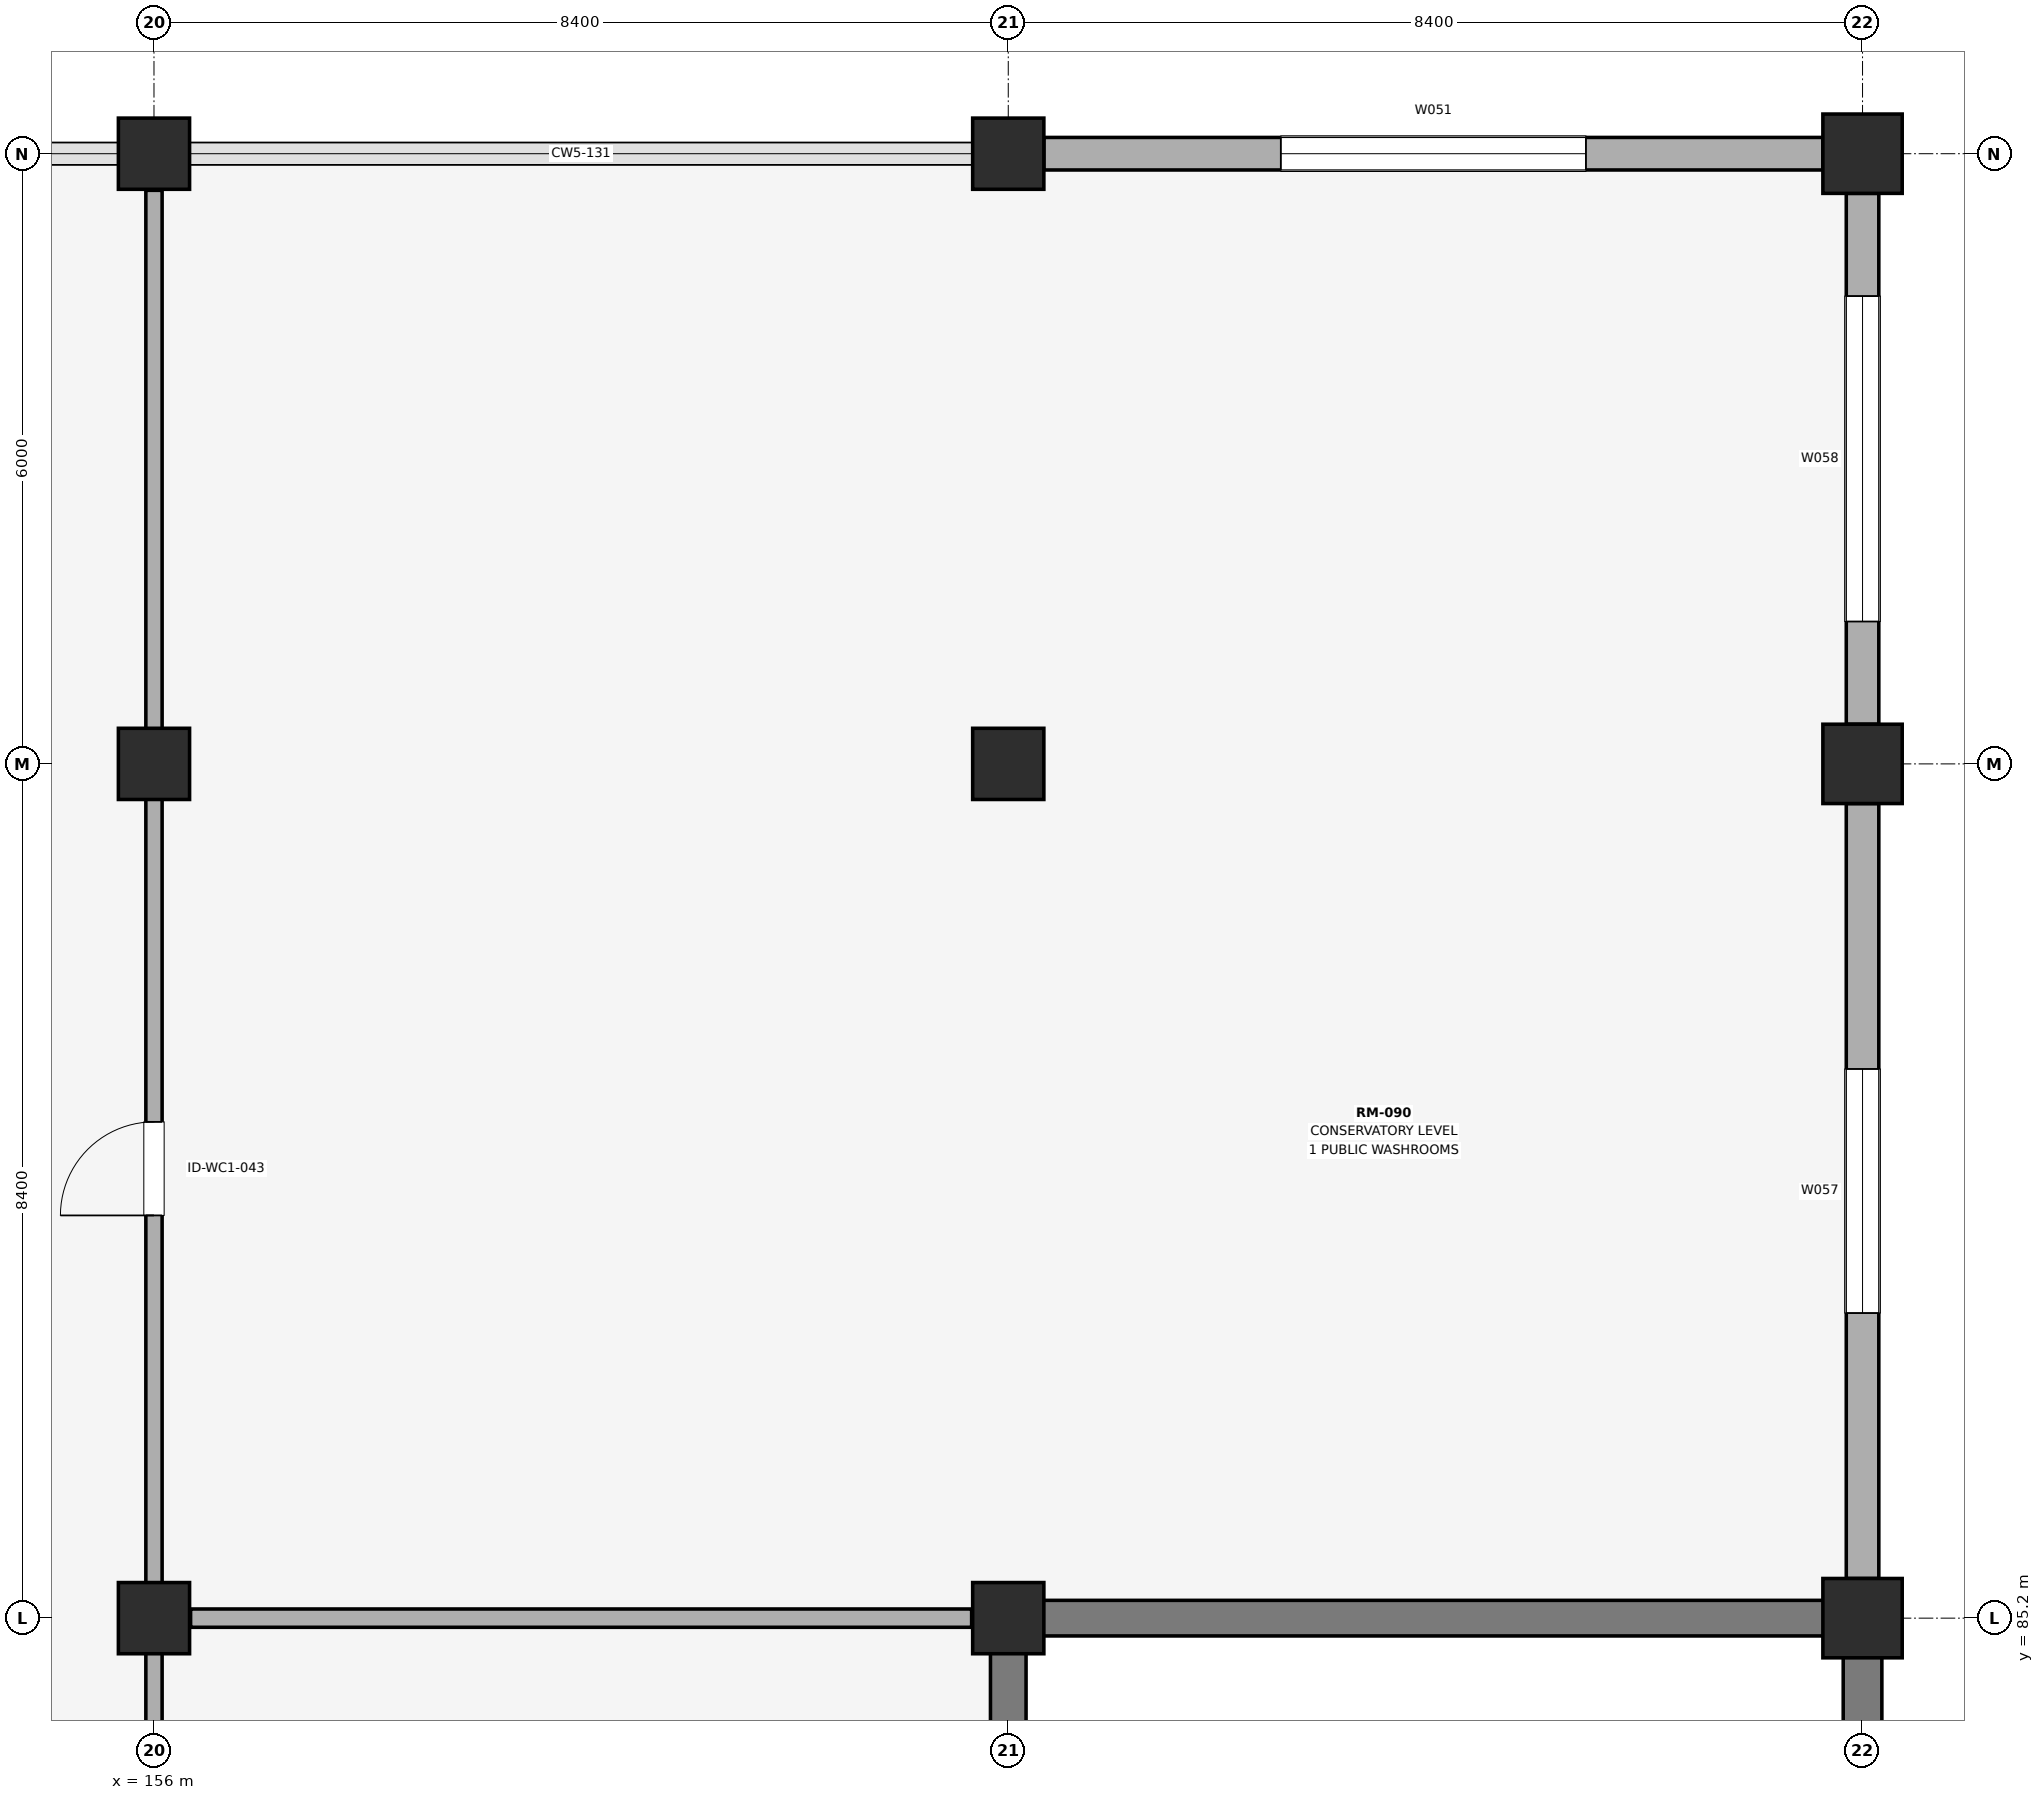
"""IFC4 building model, lengths in metres.
Left out: names, types, materials, properties, quantities, classifications, styles, units other than length and angle.
Written with IfcOpenShell. Run it as: python <this file> out.ifc"""

import sys

from ifc_helpers import new_model, si_unit, direction, frame, frame_2d, origin, origin_2d, place, context, subcontext, project, spatial, rectangle, extrude, element, fill, save


model = new_model("IFC4")
c1 = context("Model", 3, precision=1e-05, world=origin(), true_north=direction((0.0, 1.0)))
c2 = subcontext(c1, "Body", "Model", "MODEL_VIEW")
j1 = project(units=[si_unit("LENGTHUNIT", "METRE"), si_unit("PLANEANGLEUNIT", "RADIAN")], contexts=[c1])
p1 = place(None, origin())
s1 = spatial("IfcSite", under=j1, at=p1, CompositionType="ELEMENT")
p2 = place(p1, origin())
s2 = spatial("IfcBuilding", under=s1, at=p2, CompositionType="ELEMENT")
p3 = place(p2, frame((0.0, 0.0, 5.4)))
s3 = spatial("IfcBuildingStorey", under=s2, at=p3, CompositionType="ELEMENT", Elevation=5.4)
for number, where, z_axis, x_axis in (
    (1, (156.0, 85.2, 0.0), (0.0, 0.0, 1.0), (1.0, 0.0, 0.0)),
    (2, (156.0, 93.6, 0.0), (0.0, 0.0, 1.0), (1.0, 0.0, 0.0)),
    (3, (156.0, 99.6, 0.0), (0.0, 0.0, 1.0), (1.0, 0.0, 0.0)),
    (4, (164.4, 85.2, 0.0), (0.0, 0.0, 1.0), (1.0, 0.0, 0.0)),
    (5, (164.4, 93.6, 0.0), (0.0, 0.0, 1.0), (1.0, 0.0, 0.0)),
    (6, (164.4, 99.6, 0.0), (0.0, 0.0, 1.0), (1.0, 0.0, 0.0)),
):
    element("IfcColumn", number, at=place(p3, frame(where, z_axis=z_axis, x_axis=x_axis)), inside=s3, PredefinedType="COLUMN", context=c2, shape_type="SweptSolid", body=[
        extrude(rectangle(XDim=0.7, YDim=0.7, at=origin_2d()), origin(), (0.0, 0.0, 1.0), 4.8),
    ])
for number, where, z_axis, x_axis in (
    (7, (172.8, 85.2, 0.0), (0.0, 0.0, 1.0), (1.0, 0.0, 0.0)),
    (8, (172.8, 93.6, 0.0), (0.0, 0.0, 1.0), (1.0, 0.0, 0.0)),
    (9, (172.8, 99.6, 0.0), (0.0, 0.0, 1.0), (1.0, 0.0, 0.0)),
):
    element("IfcColumn", number, at=place(p3, frame(where, z_axis=z_axis, x_axis=x_axis)), inside=s3, PredefinedType="COLUMN", context=c2, shape_type="SweptSolid", body=[
        extrude(rectangle(XDim=0.78, YDim=0.78, at=origin_2d()), origin(), (0.0, 0.0, 1.0), 4.8),
    ])
p4 = place(p3, frame((164.225, 85.2, 0.0), z_axis=(0.0, 0.0, 1.0), x_axis=(1.0, 0.0, 0.0)))
e10 = element("IfcWall", 10, at=p4, inside=s3, PredefinedType="SHEAR", context=c2, shape_type="SweptSolid", body=[
    extrude(rectangle(XDim=8.75, YDim=0.35, at=frame_2d((4.375, 0.0))), origin(), (0.0, 0.0, 1.0), 4.8),
])
p5 = place(p3, frame((164.4, 77.575, 0.0), z_axis=(0.0, 0.0, 1.0), x_axis=(0.0, 1.0, 0.0)))
e11 = element("IfcWall", 11, at=p5, inside=s3, PredefinedType="SHEAR", context=c2, shape_type="SweptSolid", body=[
    extrude(rectangle(XDim=7.45, YDim=0.35, at=frame_2d((3.725, 0.0))), origin(), (0.0, 0.0, 1.0), 4.8),
])
p6 = place(p5, frame((2.1, 0.0, 0.0)))
e12 = element("IfcOpeningElement", 12, at=p6, cuts=e11, PredefinedType="OPENING", context=c2, shape_type="SweptSolid", body=[
    extrude(rectangle(XDim=1.1, YDim=2.2, at=frame_2d((0.55, 1.1))), frame((0.0, 0.185, 0.0), z_axis=(0.0, -1.0, 0.0), x_axis=(1.0, 0.0, 0.0)), (0.0, 0.0, 1.0), 0.37),
])
p7 = place(p3, frame((172.8, 77.575, 0.0), z_axis=(0.0, 0.0, 1.0), x_axis=(0.0, 1.0, 0.0)))
e13 = element("IfcWall", 13, at=p7, inside=s3, PredefinedType="SHEAR", context=c2, shape_type="SweptSolid", body=[
    extrude(rectangle(XDim=7.45, YDim=0.38, at=frame_2d((3.725, 0.0))), origin(), (0.0, 0.0, 1.0), 4.8),
])
p8 = place(p3, frame((164.75, 99.6, 0.0), z_axis=(0.0, 0.0, 1.0), x_axis=(1.0, 0.0, 0.0)))
e14 = element("IfcWall", 14, at=p8, inside=s3, PredefinedType="SOLIDWALL", context=c2, shape_type="SweptSolid", body=[
    extrude(rectangle(XDim=7.66, YDim=0.32, at=frame_2d((3.83, 0.0))), origin(), (0.0, 0.0, 1.0), 3.78),
])
p9 = place(p8, frame((2.33, 0.0, 0.95)))
e15 = element("IfcOpeningElement", 15, at=p9, cuts=e14, PredefinedType="OPENING", context=c2, shape_type="SweptSolid", body=[
    extrude(rectangle(XDim=3.0, YDim=1.8, at=frame_2d((1.5, 0.9))), frame((0.0, 0.17, 0.0), z_axis=(0.0, -1.0, 0.0), x_axis=(1.0, 0.0, 0.0)), (0.0, 0.0, 1.0), 0.34),
])
p10 = place(p3, frame((172.8, 85.59, 0.0), z_axis=(0.0, 0.0, 1.0), x_axis=(0.0, 1.0, 0.0)))
e16 = element("IfcWall", 16, at=p10, inside=s3, PredefinedType="SOLIDWALL", context=c2, shape_type="SweptSolid", body=[
    extrude(rectangle(XDim=7.62, YDim=0.32, at=frame_2d((3.81, 0.0))), origin(), (0.0, 0.0, 1.0), 3.8),
])
p11 = place(p10, frame((2.61, 0.0, 0.9)))
e17 = element("IfcOpeningElement", 17, at=p11, cuts=e16, PredefinedType="OPENING", context=c2, shape_type="SweptSolid", body=[
    extrude(rectangle(XDim=2.4, YDim=2.1, at=frame_2d((1.2, 1.05))), frame((0.0, 0.17, 0.0), z_axis=(0.0, -1.0, 0.0), x_axis=(1.0, 0.0, 0.0)), (0.0, 0.0, 1.0), 0.34),
])
p12 = place(p3, frame((172.8, 93.99, 0.0), z_axis=(0.0, 0.0, 1.0), x_axis=(0.0, 1.0, 0.0)))
e18 = element("IfcWall", 18, at=p12, inside=s3, PredefinedType="SOLIDWALL", context=c2, shape_type="SweptSolid", body=[
    extrude(rectangle(XDim=5.22, YDim=0.32, at=frame_2d((2.61, 0.0))), origin(), (0.0, 0.0, 1.0), 3.8),
])
p13 = place(p12, frame((1.01, 0.0, 0.9)))
e19 = element("IfcOpeningElement", 19, at=p13, cuts=e18, PredefinedType="OPENING", context=c2, shape_type="SweptSolid", body=[
    extrude(rectangle(XDim=3.2, YDim=2.1, at=frame_2d((1.6, 1.05))), frame((0.0, 0.17, 0.0), z_axis=(0.0, -1.0, 0.0), x_axis=(1.0, 0.0, 0.0)), (0.0, 0.0, 1.0), 0.34),
])
p14 = place(p3, frame((156.0, 24.16, 0.0), z_axis=(0.0, 0.0, 1.0), x_axis=(0.0, 1.0, 0.0)))
e20 = element("IfcWall", 20, at=p14, inside=s3, PredefinedType="PARTITIONING", context=c2, shape_type="SweptSolid", body=[
    extrude(rectangle(XDim=75.08, YDim=0.16, at=frame_2d((37.54, 0.0))), origin(), (0.0, 0.0, 1.0), 3.7),
])
p15 = place(p14, frame((6.35, 0.0, 0.0)))
e21 = element("IfcOpeningElement", 21, at=p15, cuts=e20, PredefinedType="OPENING", context=c2, shape_type="SweptSolid", body=[
    extrude(rectangle(XDim=0.98, YDim=2.2, at=frame_2d((0.49, 1.1))), frame((0.0, 0.09, 0.0), z_axis=(0.0, -1.0, 0.0), x_axis=(1.0, 0.0, 0.0)), (0.0, 0.0, 1.0), 0.18),
])
p16 = place(p14, frame((20.3, 0.0, 0.0)))
e22 = element("IfcOpeningElement", 22, at=p16, cuts=e20, PredefinedType="OPENING", context=c2, shape_type="SweptSolid", body=[
    extrude(rectangle(XDim=1.05, YDim=2.25, at=frame_2d((0.525, 1.125))), frame((0.0, 0.09, 0.0), z_axis=(0.0, -1.0, 0.0), x_axis=(1.0, 0.0, 0.0)), (0.0, 0.0, 1.0), 0.18),
])
p17 = place(p14, frame((38.05, 0.0, 0.0)))
e23 = element("IfcOpeningElement", 23, at=p17, cuts=e20, PredefinedType="OPENING", context=c2, shape_type="SweptSolid", body=[
    extrude(rectangle(XDim=1.05, YDim=2.25, at=frame_2d((0.525, 1.125))), frame((0.0, 0.09, 0.0), z_axis=(0.0, -1.0, 0.0), x_axis=(1.0, 0.0, 0.0)), (0.0, 0.0, 1.0), 0.18),
])
p18 = place(p14, frame((65.0, 0.0, 0.0)))
e24 = element("IfcOpeningElement", 24, at=p18, cuts=e20, PredefinedType="OPENING", context=c2, shape_type="SweptSolid", body=[
    extrude(rectangle(XDim=0.92, YDim=2.15, at=frame_2d((0.46, 1.075))), frame((0.0, 0.09, 0.0), z_axis=(0.0, -1.0, 0.0), x_axis=(1.0, 0.0, 0.0)), (0.0, 0.0, 1.0), 0.18),
])
p19 = place(p3, frame((156.36, 85.2, 0.0), z_axis=(0.0, 0.0, 1.0), x_axis=(1.0, 0.0, 0.0)))
e25 = element("IfcWall", 25, at=p19, inside=s3, PredefinedType="PARTITIONING", context=c2, shape_type="SweptSolid", body=[
    extrude(rectangle(XDim=7.68, YDim=0.18, at=frame_2d((3.84, 0.0))), origin(), (0.0, 0.0, 1.0), 3.78),
])
p20 = place(p9, origin())
e26 = element("IfcWindow", 26, at=p20, inside=s3, PartitioningType="SINGLE_PANEL", PredefinedType="WINDOW", context=c2, shape_type="SweptSolid", body=[
    extrude(rectangle(XDim=3.0, YDim=1.8, at=frame_2d((1.5, 0.9))), frame((0.0, 0.03, 0.0), z_axis=(0.0, -1.0, 0.0), x_axis=(1.0, 0.0, 0.0)), (0.0, 0.0, 1.0), 0.06),
])
fill(e15, e26)
p21 = place(p11, origin())
e27 = element("IfcWindow", 27, at=p21, inside=s3, PartitioningType="SINGLE_PANEL", PredefinedType="WINDOW", context=c2, shape_type="SweptSolid", body=[
    extrude(rectangle(XDim=2.4, YDim=2.1, at=frame_2d((1.2, 1.05))), frame((0.0, 0.03, 0.0), z_axis=(0.0, -1.0, 0.0), x_axis=(1.0, 0.0, 0.0)), (0.0, 0.0, 1.0), 0.06),
])
fill(e17, e27)
p22 = place(p13, origin())
e28 = element("IfcWindow", 28, at=p22, inside=s3, PartitioningType="SINGLE_PANEL", PredefinedType="WINDOW", context=c2, shape_type="SweptSolid", body=[
    extrude(rectangle(XDim=3.2, YDim=2.1, at=frame_2d((1.6, 1.05))), frame((0.0, 0.03, 0.0), z_axis=(0.0, -1.0, 0.0), x_axis=(1.0, 0.0, 0.0)), (0.0, 0.0, 1.0), 0.06),
])
fill(e19, e28)
p23 = place(p18, origin())
e29 = element("IfcDoor", 29, at=p23, inside=s3, OperationType="SINGLE_SWING_LEFT", PredefinedType="DOOR", context=c2, shape_type="SweptSolid", body=[
    extrude(rectangle(XDim=0.92, YDim=2.15, at=frame_2d((0.46, 1.075))), frame((0.0, 0.025, 0.0), z_axis=(0.0, -1.0, 0.0), x_axis=(1.0, 0.0, 0.0)), (0.0, 0.0, 1.0), 0.05),
])
fill(e24, e29)
save(model, sys.argv[1])
